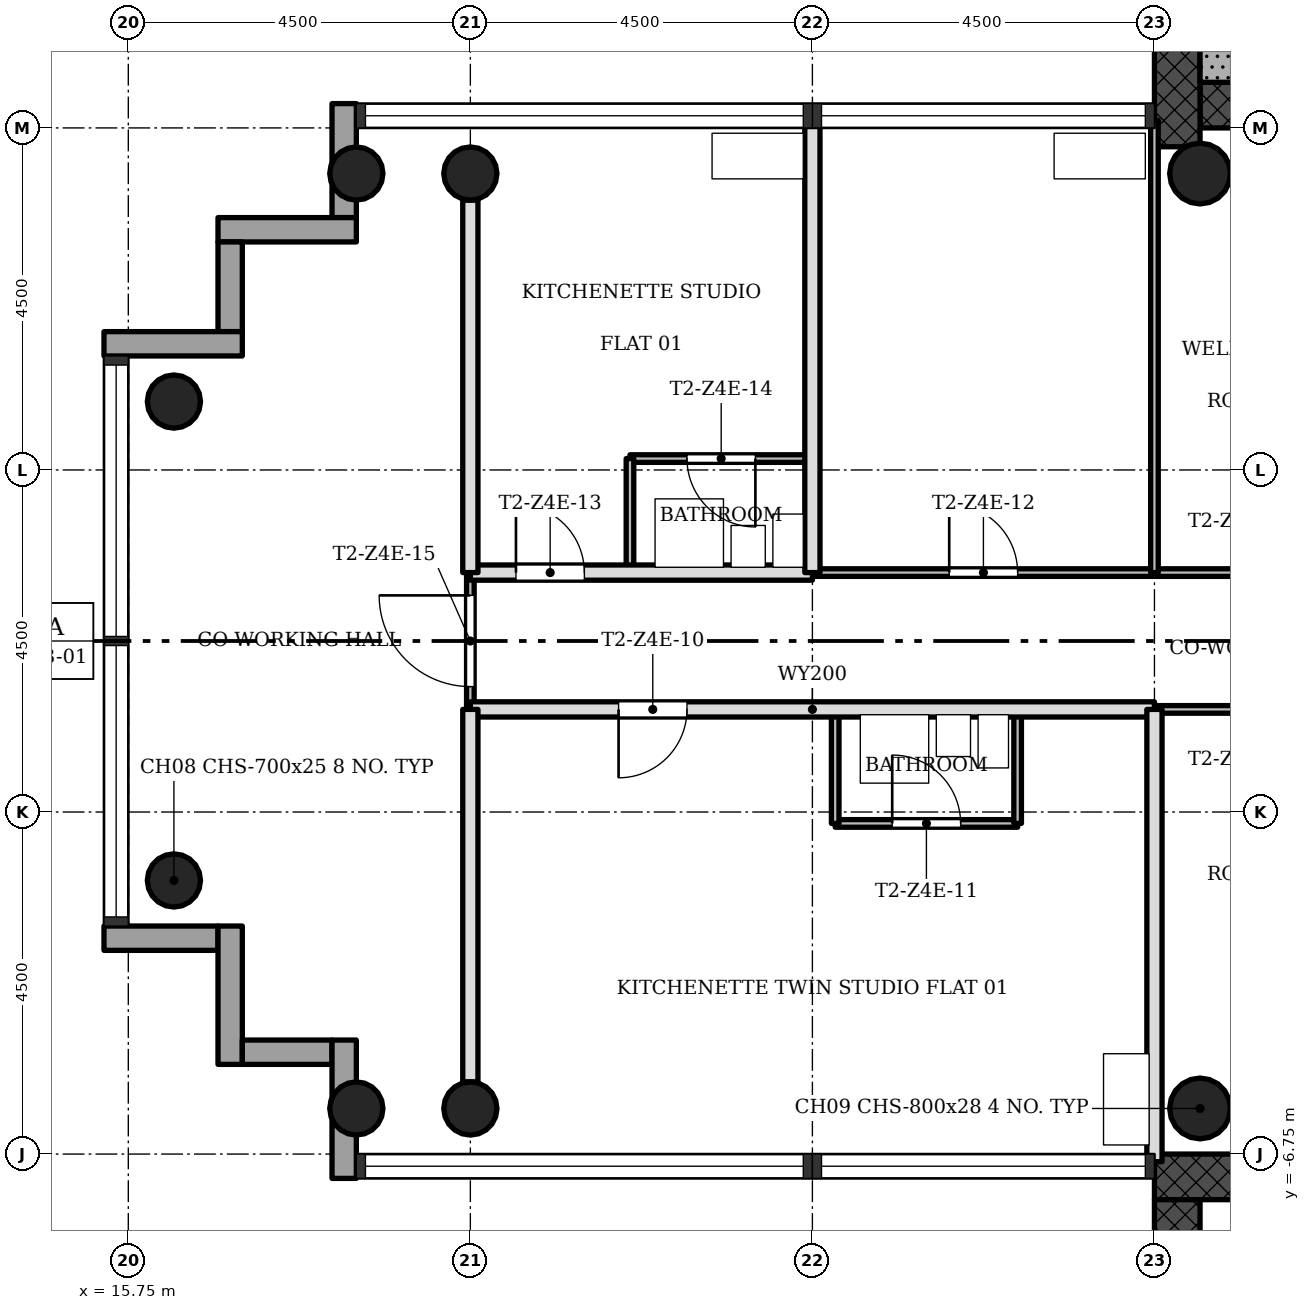
"""IFC4 building model, lengths in metres.
Left out: names, types, materials, properties, quantities, classifications, styles, units other than length and angle.
Written with IfcOpenShell. Run it as: python <this file> out.ifc"""

import sys

from ifc_helpers import new_model, si_unit, direction, frame, frame_2d, origin, origin_2d, place, context, subcontext, project, spatial, rectangle, hollow_circle, extrude, element, fill, save


model = new_model("IFC4")
c1 = context("Model", 3, precision=1e-05, world=origin(), true_north=direction((0.0, 1.0)))
c2 = subcontext(c1, "Body", "Model", "MODEL_VIEW")
j1 = project(units=[si_unit("LENGTHUNIT", "METRE"), si_unit("PLANEANGLEUNIT", "RADIAN")], contexts=[c1])
p1 = place(None, origin())
s1 = spatial("IfcSite", under=j1, at=p1, CompositionType="ELEMENT")
p2 = place(p1, origin())
s2 = spatial("IfcBuilding", under=s1, at=p2, CompositionType="ELEMENT")
p3 = place(p2, frame((0.0, 0.0, 213.0)))
s3 = spatial("IfcBuildingStorey", under=s2, at=p3, CompositionType="ELEMENT", Elevation=213.0)
p4 = place(p3, frame((29.85, 7.05, 0.0), z_axis=(0.0, 0.0, 1.0), x_axis=(1.0, 0.0, 0.0)))
e1 = element("IfcWall", 1, at=p4, inside=s3, PredefinedType="SHEAR", context=c2, shape_type="SweptSolid", body=[
    extrude(rectangle(XDim=12.9, YDim=0.6, at=frame_2d((6.45, 0.0))), origin(), (0.0, 0.0, 1.0), 3.4),
])
p5 = place(p4, frame((5.25, 0.0, 0.0)))
e2 = element("IfcOpeningElement", 2, at=p5, cuts=e1, PredefinedType="OPENING", context=c2, shape_type="SweptSolid", body=[
    extrude(rectangle(XDim=1.8, YDim=2.1, at=frame_2d((0.9, 1.05))), frame((0.0, 0.31, 0.0), z_axis=(0.0, -1.0, 0.0), x_axis=(1.0, 0.0, 0.0)), (0.0, 0.0, 1.0), 0.62),
])
p6 = place(p3, frame((29.55, 15.15, 0.0), z_axis=(0.0, 0.0, 1.0), x_axis=(0.0, -1.0, 0.0)))
e3 = element("IfcWall", 3, at=p6, inside=s3, PredefinedType="SHEAR", context=c2, shape_type="SweptSolid", body=[
    extrude(rectangle(XDim=8.648, YDim=0.6, at=frame_2d((4.324, 0.0))), origin(), (0.0, 0.0, 1.0), 3.4),
])
p7 = place(p3, frame((42.15, -7.05, 0.0), z_axis=(0.0, 0.0, 1.0), x_axis=(-1.0, 0.0, 0.0)))
e4 = element("IfcWall", 4, at=p7, inside=s3, PredefinedType="SHEAR", context=c2, shape_type="SweptSolid", body=[
    extrude(rectangle(XDim=12.9, YDim=0.6, at=frame_2d((6.45, 0.0))), origin(), (0.0, 0.0, 1.0), 3.4),
])
p8 = place(p7, frame((5.25, 0.0, 0.0)))
e5 = element("IfcOpeningElement", 5, at=p8, cuts=e4, PredefinedType="OPENING", context=c2, shape_type="SweptSolid", body=[
    extrude(rectangle(XDim=1.8, YDim=2.1, at=frame_2d((0.9, 1.05))), frame((0.0, 0.31, 0.0), z_axis=(0.0, -1.0, 0.0), x_axis=(1.0, 0.0, 0.0)), (0.0, 0.0, 1.0), 0.62),
])
p9 = place(p3, frame((29.55, -7.35, 0.0), z_axis=(0.0, 0.0, 1.0), x_axis=(0.0, -1.0, 0.0)))
e6 = element("IfcWall", 6, at=p9, inside=s3, PredefinedType="SHEAR", context=c2, shape_type="SweptSolid", body=[
    extrude(rectangle(XDim=8.4, YDim=0.6, at=frame_2d((4.2, 0.0))), origin(), (0.0, 0.0, 1.0), 3.4),
])
for number, where, z_axis, x_axis in (
    (7, (20.25, 6.15, 0.0), (0.0, 0.0, 1.0), (1.0, 0.0, 0.0)),
    (8, (20.25, -6.15, 0.0), (0.0, 0.0, 1.0), (1.0, 0.0, 0.0)),
    (9, (18.75, 6.15, 0.0), (0.0, 0.0, 1.0), (1.0, 0.0, 0.0)),
    (10, (18.75, -6.15, 0.0), (0.0, 0.0, 1.0), (1.0, 0.0, 0.0)),
    (11, (16.35, 3.15, 0.0), (0.0, 0.0, 1.0), (1.0, 0.0, 0.0)),
    (12, (16.35, -3.15, 0.0), (0.0, 0.0, 1.0), (1.0, 0.0, 0.0)),
):
    element("IfcColumn", number, at=place(p3, frame(where, z_axis=z_axis, x_axis=x_axis)), inside=s3, PredefinedType="COLUMN", context=c2, shape_type="SweptSolid", body=[
        extrude(hollow_circle(Radius=0.35, WallThickness=0.025, at=origin_2d()), origin(), (0.0, 0.0, 1.0), 3.4),
    ])
for number, where, z_axis, x_axis in (
    (13, (29.85, 6.15, 0.0), (0.0, 0.0, 1.0), (1.0, 0.0, 0.0)),
    (14, (29.85, -6.15, 0.0), (0.0, 0.0, 1.0), (1.0, 0.0, 0.0)),
):
    element("IfcColumn", number, at=place(p3, frame(where, z_axis=z_axis, x_axis=x_axis)), inside=s3, PredefinedType="COLUMN", context=c2, shape_type="SweptSolid", body=[
        extrude(hollow_circle(Radius=0.4, WallThickness=0.028, at=origin_2d()), origin(), (0.0, 0.0, 1.0), 3.4),
    ])
p10 = place(p3, frame((18.59, 7.07, -0.3), z_axis=(0.0, 0.0, 1.0), x_axis=(0.0, -1.0, 0.0)))
e15 = element("IfcWall", 15, at=p10, inside=s3, PredefinedType="STANDARD", context=c2, shape_type="SweptSolid", body=[
    extrude(rectangle(XDim=1.5, YDim=0.32, at=frame_2d((0.75, 0.0))), origin(), (0.0, 0.0, 1.0), 3.4),
])
p11 = place(p3, frame((18.75, 5.41, -0.3), z_axis=(0.0, 0.0, 1.0), x_axis=(-1.0, 0.0, 0.0)))
e16 = element("IfcWall", 16, at=p11, inside=s3, PredefinedType="STANDARD", context=c2, shape_type="SweptSolid", body=[
    extrude(rectangle(XDim=1.82, YDim=0.32, at=frame_2d((0.91, 0.0))), origin(), (0.0, 0.0, 1.0), 3.4),
])
p12 = place(p3, frame((17.09, 5.25, -0.3), z_axis=(0.0, 0.0, 1.0), x_axis=(0.0, -1.0, 0.0)))
e17 = element("IfcWall", 17, at=p12, inside=s3, PredefinedType="STANDARD", context=c2, shape_type="SweptSolid", body=[
    extrude(rectangle(XDim=1.18, YDim=0.32, at=frame_2d((0.59, 0.0))), origin(), (0.0, 0.0, 1.0), 3.4),
])
p13 = place(p3, frame((17.25, 3.91, -0.3), z_axis=(0.0, 0.0, 1.0), x_axis=(-1.0, 0.0, 0.0)))
e18 = element("IfcWall", 18, at=p13, inside=s3, PredefinedType="STANDARD", context=c2, shape_type="SweptSolid", body=[
    extrude(rectangle(XDim=1.82, YDim=0.32, at=frame_2d((0.91, 0.0))), origin(), (0.0, 0.0, 1.0), 3.4),
])
p14 = place(p3, frame((15.43, -3.91, -0.3), z_axis=(0.0, 0.0, 1.0), x_axis=(1.0, 0.0, 0.0)))
e19 = element("IfcWall", 19, at=p14, inside=s3, PredefinedType="STANDARD", context=c2, shape_type="SweptSolid", body=[
    extrude(rectangle(XDim=1.5, YDim=0.32, at=frame_2d((0.75, 0.0))), origin(), (0.0, 0.0, 1.0), 3.4),
])
p15 = place(p3, frame((17.09, -3.75, -0.3), z_axis=(0.0, 0.0, 1.0), x_axis=(0.0, -1.0, 0.0)))
e20 = element("IfcWall", 20, at=p15, inside=s3, PredefinedType="STANDARD", context=c2, shape_type="SweptSolid", body=[
    extrude(rectangle(XDim=1.82, YDim=0.32, at=frame_2d((0.91, 0.0))), origin(), (0.0, 0.0, 1.0), 3.4),
])
p16 = place(p3, frame((17.25, -5.41, -0.3), z_axis=(0.0, 0.0, 1.0), x_axis=(1.0, 0.0, 0.0)))
e21 = element("IfcWall", 21, at=p16, inside=s3, PredefinedType="STANDARD", context=c2, shape_type="SweptSolid", body=[
    extrude(rectangle(XDim=1.18, YDim=0.32, at=frame_2d((0.59, 0.0))), origin(), (0.0, 0.0, 1.0), 3.4),
])
p17 = place(p3, frame((18.59, -5.25, -0.3), z_axis=(0.0, 0.0, 1.0), x_axis=(0.0, -1.0, 0.0)))
e22 = element("IfcWall", 22, at=p17, inside=s3, PredefinedType="STANDARD", context=c2, shape_type="SweptSolid", body=[
    extrude(rectangle(XDim=1.82, YDim=0.32, at=frame_2d((0.91, 0.0))), origin(), (0.0, 0.0, 1.0), 3.4),
])
p18 = place(p3, frame((27.45, -2.4, 0.0), z_axis=(0.0, 0.0, 1.0), x_axis=(-1.0, 0.0, 0.0)))
e23 = element("IfcWall", 23, at=p18, inside=s3, PredefinedType="PARTITIONING", context=c2, shape_type="SweptSolid", body=[
    extrude(rectangle(XDim=2.4, YDim=0.1, at=frame_2d((1.2, 0.0))), origin(), (0.0, 0.0, 1.0), 3.0),
])
p19 = place(p18, frame((0.75, 0.0, 0.0)))
e24 = element("IfcOpeningElement", 24, at=p19, cuts=e23, PredefinedType="OPENING", context=c2, shape_type="SweptSolid", body=[
    extrude(rectangle(XDim=0.9, YDim=2.1, at=frame_2d((0.45, 1.05))), frame((0.0, 0.06, 0.0), z_axis=(0.0, -1.0, 0.0), x_axis=(1.0, 0.0, 0.0)), (0.0, 0.0, 1.0), 0.12),
])
p20 = place(p3, frame((31.5, -0.9, 0.0), z_axis=(0.0, 0.0, 1.0), x_axis=(-1.0, 0.0, 0.0)))
e25 = element("IfcWall", 25, at=p20, inside=s3, PredefinedType="PARTITIONING", context=c2, shape_type="SweptSolid", body=[
    extrude(rectangle(XDim=2.25, YDim=0.1, at=frame_2d((1.125, 0.0))), origin(), (0.0, 0.0, 1.0), 3.0),
])
p21 = place(p3, frame((29.25, -0.9, 0.0), z_axis=(0.0, 0.0, 1.0), x_axis=(-1.0, 0.0, 0.0)))
e26 = element("IfcWall", 26, at=p21, inside=s3, PredefinedType="SOLIDWALL", context=c2, shape_type="SweptSolid", body=[
    extrude(rectangle(XDim=9.0, YDim=0.2, at=frame_2d((4.5, 0.0))), origin(), (0.0, 0.0, 1.0), 3.0),
])
p22 = place(p21, frame((6.15, 0.0, 0.0)))
e27 = element("IfcOpeningElement", 27, at=p22, cuts=e26, PredefinedType="OPENING", context=c2, shape_type="SweptSolid", body=[
    extrude(rectangle(XDim=0.9, YDim=2.1, at=frame_2d((0.45, 1.05))), frame((0.0, 0.11, 0.0), z_axis=(0.0, -1.0, 0.0), x_axis=(1.0, 0.0, 0.0)), (0.0, 0.0, 1.0), 0.22),
])
p23 = place(p3, frame((31.5, 0.9, 0.0), z_axis=(0.0, 0.0, 1.0), x_axis=(-1.0, 0.0, 0.0)))
e28 = element("IfcWall", 28, at=p23, inside=s3, PredefinedType="PARTITIONING", context=c2, shape_type="SweptSolid", body=[
    extrude(rectangle(XDim=6.75, YDim=0.1, at=frame_2d((3.375, 0.0))), origin(), (0.0, 0.0, 1.0), 3.0),
])
p24 = place(p23, frame((4.05, 0.0, 0.0)))
e29 = element("IfcOpeningElement", 29, at=p24, cuts=e28, PredefinedType="OPENING", context=c2, shape_type="SweptSolid", body=[
    extrude(rectangle(XDim=0.9, YDim=2.1, at=frame_2d((0.45, 1.05))), frame((0.0, 0.06, 0.0), z_axis=(0.0, -1.0, 0.0), x_axis=(1.0, 0.0, 0.0)), (0.0, 0.0, 1.0), 0.12),
])
p25 = place(p3, frame((24.75, 0.9, 0.0), z_axis=(0.0, 0.0, 1.0), x_axis=(-1.0, 0.0, 0.0)))
e30 = element("IfcWall", 30, at=p25, inside=s3, PredefinedType="SOLIDWALL", context=c2, shape_type="SweptSolid", body=[
    extrude(rectangle(XDim=4.5, YDim=0.2, at=frame_2d((2.25, 0.0))), origin(), (0.0, 0.0, 1.0), 3.0),
])
p26 = place(p25, frame((3.0, 0.0, 0.0)))
e31 = element("IfcOpeningElement", 31, at=p26, cuts=e30, PredefinedType="OPENING", context=c2, shape_type="SweptSolid", body=[
    extrude(rectangle(XDim=0.9, YDim=2.1, at=frame_2d((0.45, 1.05))), frame((0.0, 0.11, 0.0), z_axis=(0.0, -1.0, 0.0), x_axis=(1.0, 0.0, 0.0)), (0.0, 0.0, 1.0), 0.22),
])
p27 = place(p3, frame((24.75, 2.4, 0.0), z_axis=(0.0, 0.0, 1.0), x_axis=(-1.0, 0.0, 0.0)))
e32 = element("IfcWall", 32, at=p27, inside=s3, PredefinedType="PARTITIONING", context=c2, shape_type="SweptSolid", body=[
    extrude(rectangle(XDim=2.4, YDim=0.1, at=frame_2d((1.2, 0.0))), origin(), (0.0, 0.0, 1.0), 3.0),
])
p28 = place(p27, frame((0.75, 0.0, 0.0)))
e33 = element("IfcOpeningElement", 33, at=p28, cuts=e32, PredefinedType="OPENING", context=c2, shape_type="SweptSolid", body=[
    extrude(rectangle(XDim=0.9, YDim=2.1, at=frame_2d((0.45, 1.05))), frame((0.0, 0.06, 0.0), z_axis=(0.0, -1.0, 0.0), x_axis=(1.0, 0.0, 0.0)), (0.0, 0.0, 1.0), 0.12),
])
p29 = place(p3, frame((29.25, 0.9, 0.0), z_axis=(0.0, 0.0, 1.0), x_axis=(0.0, 1.0, 0.0)))
e34 = element("IfcWall", 34, at=p29, inside=s3, PredefinedType="PARTITIONING", context=c2, shape_type="SweptSolid", body=[
    extrude(rectangle(XDim=5.95, YDim=0.1, at=frame_2d((2.975, 0.0))), origin(), (0.0, 0.0, 1.0), 3.0),
])
p30 = place(p3, frame((29.25, -6.85, 0.0), z_axis=(0.0, 0.0, 1.0), x_axis=(0.0, 1.0, 0.0)))
e35 = element("IfcWall", 35, at=p30, inside=s3, PredefinedType="SOLIDWALL", context=c2, shape_type="SweptSolid", body=[
    extrude(rectangle(XDim=5.95, YDim=0.2, at=frame_2d((2.975, 0.0))), origin(), (0.0, 0.0, 1.0), 3.0),
])
for number, where, z_axis, x_axis in (
    (36, (27.45, -2.4, 0.0), (0.0, 0.0, 1.0), (0.0, 1.0, 0.0)),
    (37, (25.05, -2.4, 0.0), (0.0, 0.0, 1.0), (0.0, 1.0, 0.0)),
):
    element("IfcWall", number, at=place(p3, frame(where, z_axis=z_axis, x_axis=x_axis)), inside=s3, PredefinedType="PARTITIONING", context=c2, shape_type="SweptSolid", body=[
        extrude(rectangle(XDim=1.5, YDim=0.1, at=frame_2d((0.75, 0.0))), origin(), (0.0, 0.0, 1.0), 3.0),
    ])
p31 = place(p3, frame((24.75, 0.9, 0.0), z_axis=(0.0, 0.0, 1.0), x_axis=(0.0, 1.0, 0.0)))
e38 = element("IfcWall", 38, at=p31, inside=s3, PredefinedType="SOLIDWALL", context=c2, shape_type="SweptSolid", body=[
    extrude(rectangle(XDim=5.95, YDim=0.2, at=frame_2d((2.975, 0.0))), origin(), (0.0, 0.0, 1.0), 3.0),
])
p32 = place(p3, frame((22.35, 0.9, 0.0), z_axis=(0.0, 0.0, 1.0), x_axis=(0.0, 1.0, 0.0)))
e39 = element("IfcWall", 39, at=p32, inside=s3, PredefinedType="PARTITIONING", context=c2, shape_type="SweptSolid", body=[
    extrude(rectangle(XDim=1.5, YDim=0.1, at=frame_2d((0.75, 0.0))), origin(), (0.0, 0.0, 1.0), 3.0),
])
p33 = place(p3, frame((20.25, -0.9, 0.0), z_axis=(0.0, 0.0, 1.0), x_axis=(0.0, 1.0, 0.0)))
e40 = element("IfcWall", 40, at=p33, inside=s3, PredefinedType="PARTITIONING", context=c2, shape_type="SweptSolid", body=[
    extrude(rectangle(XDim=1.8, YDim=0.1, at=frame_2d((0.9, 0.0))), origin(), (0.0, 0.0, 1.0), 3.0),
])
p34 = place(p33, frame((0.3, 0.0, 0.0)))
e41 = element("IfcOpeningElement", 41, at=p34, cuts=e40, PredefinedType="OPENING", context=c2, shape_type="SweptSolid", body=[
    extrude(rectangle(XDim=1.2, YDim=2.1, at=frame_2d((0.6, 1.05))), frame((0.0, 0.06, 0.0), z_axis=(0.0, -1.0, 0.0), x_axis=(1.0, 0.0, 0.0)), (0.0, 0.0, 1.0), 0.12),
])
for number, where, z_axis, x_axis in (
    (42, (20.25, -5.8, 0.0), (0.0, 0.0, 1.0), (0.0, 1.0, 0.0)),
    (43, (20.25, 0.9, 0.0), (0.0, 0.0, 1.0), (0.0, 1.0, 0.0)),
):
    element("IfcWall", number, at=place(p3, frame(where, z_axis=z_axis, x_axis=x_axis)), inside=s3, PredefinedType="SOLIDWALL", context=c2, shape_type="SweptSolid", body=[
        extrude(rectangle(XDim=4.9, YDim=0.2, at=frame_2d((2.45, 0.0))), origin(), (0.0, 0.0, 1.0), 3.0),
    ])
p35 = place(p3, frame((34.15, 7.65, 0.0), z_axis=(0.0, 0.0, 1.0), x_axis=(-1.0, 0.0, 0.0)))
e44 = element("IfcWall", 44, at=p35, inside=s3, PredefinedType="SHEAR", context=c2, shape_type="SweptSolid", body=[
    extrude(rectangle(XDim=4.3, YDim=0.6, at=frame_2d((2.15, 0.0))), origin(), (0.0, 0.0, 1.0), 3.4),
])
p36 = place(p22, origin())
e45 = element("IfcDoor", 45, at=p36, inside=s3, OperationType="SINGLE_SWING_LEFT", PredefinedType="DOOR", context=c2, shape_type="SweptSolid", body=[
    extrude(rectangle(XDim=0.9, YDim=2.1, at=frame_2d((0.45, 1.05))), frame((0.0, 0.025, 0.0), z_axis=(0.0, -1.0, 0.0), x_axis=(1.0, 0.0, 0.0)), (0.0, 0.0, 1.0), 0.05),
])
fill(e27, e45)
p37 = place(p19, origin())
e46 = element("IfcDoor", 46, at=p37, inside=s3, OperationType="SINGLE_SWING_RIGHT", PredefinedType="DOOR", context=c2, shape_type="SweptSolid", body=[
    extrude(rectangle(XDim=0.9, YDim=2.1, at=frame_2d((0.45, 1.05))), frame((0.0, 0.025, 0.0), z_axis=(0.0, -1.0, 0.0), x_axis=(1.0, 0.0, 0.0)), (0.0, 0.0, 1.0), 0.05),
])
fill(e24, e46)
p38 = place(p24, origin())
e47 = element("IfcDoor", 47, at=p38, inside=s3, OperationType="SINGLE_SWING_RIGHT", PredefinedType="DOOR", context=c2, shape_type="SweptSolid", body=[
    extrude(rectangle(XDim=0.9, YDim=2.1, at=frame_2d((0.45, 1.05))), frame((0.0, 0.025, 0.0), z_axis=(0.0, -1.0, 0.0), x_axis=(1.0, 0.0, 0.0)), (0.0, 0.0, 1.0), 0.05),
])
fill(e29, e47)
p39 = place(p26, origin())
e48 = element("IfcDoor", 48, at=p39, inside=s3, OperationType="SINGLE_SWING_RIGHT", PredefinedType="DOOR", context=c2, shape_type="SweptSolid", body=[
    extrude(rectangle(XDim=0.9, YDim=2.1, at=frame_2d((0.45, 1.05))), frame((0.0, 0.025, 0.0), z_axis=(0.0, -1.0, 0.0), x_axis=(1.0, 0.0, 0.0)), (0.0, 0.0, 1.0), 0.05),
])
fill(e31, e48)
p40 = place(p28, origin())
e49 = element("IfcDoor", 49, at=p40, inside=s3, OperationType="SINGLE_SWING_RIGHT", PredefinedType="DOOR", context=c2, shape_type="SweptSolid", body=[
    extrude(rectangle(XDim=0.9, YDim=2.1, at=frame_2d((0.45, 1.05))), frame((0.0, 0.025, 0.0), z_axis=(0.0, -1.0, 0.0), x_axis=(1.0, 0.0, 0.0)), (0.0, 0.0, 1.0), 0.05),
])
fill(e33, e49)
p41 = place(p34, origin())
e50 = element("IfcDoor", 50, at=p41, inside=s3, OperationType="SINGLE_SWING_LEFT", PredefinedType="DOOR", context=c2, shape_type="SweptSolid", body=[
    extrude(rectangle(XDim=1.2, YDim=2.1, at=frame_2d((0.6, 1.05))), frame((0.0, 0.025, 0.0), z_axis=(0.0, -1.0, 0.0), x_axis=(1.0, 0.0, 0.0)), (0.0, 0.0, 1.0), 0.05),
])
fill(e41, e50)
save(model, sys.argv[1])
